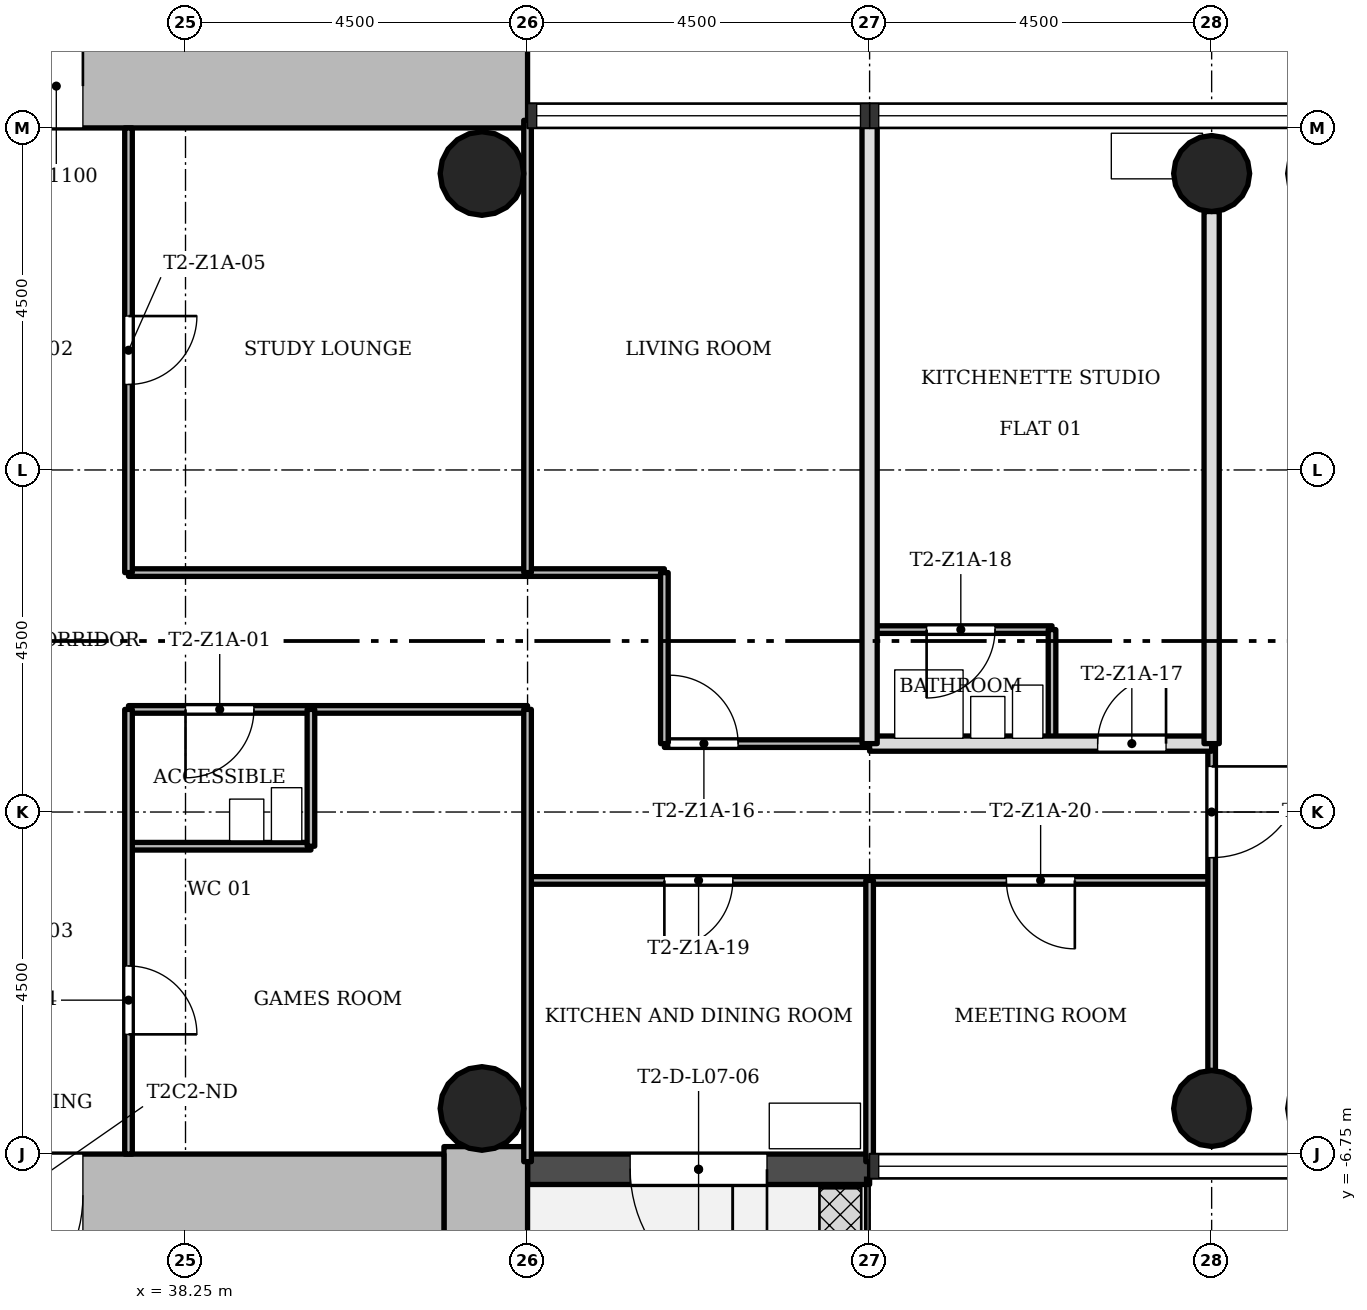
"""IFC4 building model, lengths in metres.
Left out: names, types, materials, properties, quantities, classifications, styles, units other than length and angle.
Written with IfcOpenShell. Run it as: python <this file> out.ifc"""

import sys

from ifc_helpers import new_model, si_unit, direction, frame, frame_2d, origin, origin_2d, place, context, subcontext, project, spatial, rectangle, hollow_circle, extrude, element, fill, save


model = new_model("IFC4")
c1 = context("Model", 3, precision=1e-05, world=origin(), true_north=direction((0.0, 1.0)))
c2 = subcontext(c1, "Body", "Model", "MODEL_VIEW")
j1 = project(units=[si_unit("LENGTHUNIT", "METRE"), si_unit("PLANEANGLEUNIT", "RADIAN")], contexts=[c1])
p1 = place(None, origin())
s1 = spatial("IfcSite", under=j1, at=p1, CompositionType="ELEMENT")
p2 = place(p1, origin())
s2 = spatial("IfcBuilding", under=s1, at=p2, CompositionType="ELEMENT")
p3 = place(p2, frame((0.0, 0.0, 31.3)))
s3 = spatial("IfcBuildingStorey", under=s2, at=p3, CompositionType="ELEMENT", Elevation=31.3)
p4 = place(p3, frame((30.35, 7.3, 0.0), z_axis=(0.0, 0.0, 1.0), x_axis=(1.0, 0.0, 0.0)))
e1 = element("IfcWall", 1, at=p4, inside=s3, PredefinedType="SHEAR", context=c2, shape_type="SweptSolid", body=[
    extrude(rectangle(XDim=12.4, YDim=1.1, at=frame_2d((6.2, 0.0))), origin(), (0.0, 0.0, 1.0), 3.4),
])
p5 = place(p4, frame((4.75, 0.0, 0.0)))
e2 = element("IfcOpeningElement", 2, at=p5, cuts=e1, PredefinedType="OPENING", context=c2, shape_type="SweptSolid", body=[
    extrude(rectangle(XDim=1.8, YDim=2.1, at=frame_2d((0.9, 1.05))), frame((0.0, 0.56, 0.0), z_axis=(0.0, -1.0, 0.0), x_axis=(1.0, 0.0, 0.0)), (0.0, 0.0, 1.0), 1.12),
])
p6 = place(p3, frame((42.2, -15.248, 0.0), z_axis=(0.0, 0.0, 1.0), x_axis=(0.0, 1.0, 0.0)))
e3 = element("IfcWall", 3, at=p6, inside=s3, PredefinedType="SHEAR", context=c2, shape_type="SweptSolid", body=[
    extrude(rectangle(XDim=8.596, YDim=1.1, at=frame_2d((4.298, 0.0))), origin(), (0.0, 0.0, 1.0), 3.4),
])
p7 = place(p3, frame((41.65, -7.3, 0.0), z_axis=(0.0, 0.0, 1.0), x_axis=(-1.0, 0.0, 0.0)))
e4 = element("IfcWall", 4, at=p7, inside=s3, PredefinedType="SHEAR", context=c2, shape_type="SweptSolid", body=[
    extrude(rectangle(XDim=12.4, YDim=1.1, at=frame_2d((6.2, 0.0))), origin(), (0.0, 0.0, 1.0), 3.4),
])
p8 = place(p7, frame((4.75, 0.0, 0.0)))
e5 = element("IfcOpeningElement", 5, at=p8, cuts=e4, PredefinedType="OPENING", context=c2, shape_type="SweptSolid", body=[
    extrude(rectangle(XDim=1.8, YDim=2.1, at=frame_2d((0.9, 1.05))), frame((0.0, 0.56, 0.0), z_axis=(0.0, -1.0, 0.0), x_axis=(1.0, 0.0, 0.0)), (0.0, 0.0, 1.0), 1.12),
])
for number, where, z_axis, x_axis in (
    (6, (51.75, -6.15, 0.0), (0.0, 0.0, 1.0), (1.0, 0.0, 0.0)),
    (7, (51.75, 6.15, 0.0), (0.0, 0.0, 1.0), (1.0, 0.0, 0.0)),
):
    element("IfcColumn", number, at=place(p3, frame(where, z_axis=z_axis, x_axis=x_axis)), inside=s3, PredefinedType="COLUMN", context=c2, shape_type="SweptSolid", body=[
        extrude(hollow_circle(Radius=0.5, WallThickness=0.036, at=origin_2d()), origin(), (0.0, 0.0, 1.0), 3.4),
    ])
for number, where, z_axis, x_axis in (
    (8, (42.15, -6.15, 0.0), (0.0, 0.0, 1.0), (1.0, 0.0, 0.0)),
    (9, (42.15, 6.15, 0.0), (0.0, 0.0, 1.0), (1.0, 0.0, 0.0)),
):
    element("IfcColumn", number, at=place(p3, frame(where, z_axis=z_axis, x_axis=x_axis)), inside=s3, PredefinedType="COLUMN", context=c2, shape_type="SweptSolid", body=[
        extrude(hollow_circle(Radius=0.55, WallThickness=0.04, at=origin_2d()), origin(), (0.0, 0.0, 1.0), 3.4),
    ])
p9 = place(p3, frame((42.75, -6.95, -0.02), z_axis=(0.0, 0.0, 1.0), x_axis=(1.0, 0.0, 0.0)))
e10 = element("IfcWall", 10, at=p9, inside=s3, PredefinedType="STANDARD", context=c2, shape_type="SweptSolid", body=[
    extrude(rectangle(XDim=4.5, YDim=0.4, at=frame_2d((2.25, 0.0))), origin(), (0.0, 0.0, 1.0), 3.12),
])
p10 = place(p9, frame((1.35, 0.0, 0.02)))
e11 = element("IfcOpeningElement", 11, at=p10, cuts=e10, PredefinedType="OPENING", context=c2, shape_type="SweptSolid", body=[
    extrude(rectangle(XDim=1.8, YDim=2.1, at=frame_2d((0.9, 1.05))), frame((0.0, 0.21, 0.0), z_axis=(0.0, -1.0, 0.0), x_axis=(1.0, 0.0, 0.0)), (0.0, 0.0, 1.0), 0.42),
])
p11 = place(p3, frame((51.75, -3.15, 0.0), z_axis=(0.0, 0.0, 1.0), x_axis=(-1.0, 0.0, 0.0)))
e12 = element("IfcWall", 12, at=p11, inside=s3, PredefinedType="PARTITIONING", context=c2, shape_type="SweptSolid", body=[
    extrude(rectangle(XDim=9.0, YDim=0.1, at=frame_2d((4.5, 0.0))), origin(), (0.0, 0.0, 1.0), 3.0),
])
p12 = place(p11, frame((6.3, 0.0, 0.0)))
e13 = element("IfcOpeningElement", 13, at=p12, cuts=e12, PredefinedType="OPENING", context=c2, shape_type="SweptSolid", body=[
    extrude(rectangle(XDim=0.9, YDim=2.1, at=frame_2d((0.45, 1.05))), frame((0.0, 0.06, 0.0), z_axis=(0.0, -1.0, 0.0), x_axis=(1.0, 0.0, 0.0)), (0.0, 0.0, 1.0), 0.12),
])
p13 = place(p11, frame((1.8, 0.0, 0.0)))
e14 = element("IfcOpeningElement", 14, at=p13, cuts=e12, PredefinedType="OPENING", context=c2, shape_type="SweptSolid", body=[
    extrude(rectangle(XDim=0.9, YDim=2.1, at=frame_2d((0.45, 1.05))), frame((0.0, 0.06, 0.0), z_axis=(0.0, -1.0, 0.0), x_axis=(1.0, 0.0, 0.0)), (0.0, 0.0, 1.0), 0.12),
])
p14 = place(p3, frame((39.9, -2.7, 0.0), z_axis=(0.0, 0.0, 1.0), x_axis=(-1.0, 0.0, 0.0)))
e15 = element("IfcWall", 15, at=p14, inside=s3, PredefinedType="PARTITIONING", context=c2, shape_type="SweptSolid", body=[
    extrude(rectangle(XDim=2.4, YDim=0.1, at=frame_2d((1.2, 0.0))), origin(), (0.0, 0.0, 1.0), 3.0),
])
p15 = place(p3, frame((47.25, -1.35, 0.0), z_axis=(0.0, 0.0, 1.0), x_axis=(-1.0, 0.0, 0.0)))
e16 = element("IfcWall", 16, at=p15, inside=s3, PredefinedType="PARTITIONING", context=c2, shape_type="SweptSolid", body=[
    extrude(rectangle(XDim=2.7, YDim=0.1, at=frame_2d((1.35, 0.0))), origin(), (0.0, 0.0, 1.0), 3.0),
])
p16 = place(p15, frame((1.73, 0.0, 0.0)))
e17 = element("IfcOpeningElement", 17, at=p16, cuts=e16, PredefinedType="OPENING", context=c2, shape_type="SweptSolid", body=[
    extrude(rectangle(XDim=0.9, YDim=2.1, at=frame_2d((0.45, 1.05))), frame((0.0, 0.06, 0.0), z_axis=(0.0, -1.0, 0.0), x_axis=(1.0, 0.0, 0.0)), (0.0, 0.0, 1.0), 0.12),
])
p17 = place(p3, frame((51.75, -1.35, 0.0), z_axis=(0.0, 0.0, 1.0), x_axis=(-1.0, 0.0, 0.0)))
e18 = element("IfcWall", 18, at=p17, inside=s3, PredefinedType="SOLIDWALL", context=c2, shape_type="SweptSolid", body=[
    extrude(rectangle(XDim=4.5, YDim=0.2, at=frame_2d((2.25, 0.0))), origin(), (0.0, 0.0, 1.0), 3.0),
])
p18 = place(p17, frame((0.6, 0.0, 0.0)))
e19 = element("IfcOpeningElement", 19, at=p18, cuts=e18, PredefinedType="OPENING", context=c2, shape_type="SweptSolid", body=[
    extrude(rectangle(XDim=0.9, YDim=2.1, at=frame_2d((0.45, 1.05))), frame((0.0, 0.11, 0.0), z_axis=(0.0, -1.0, 0.0), x_axis=(1.0, 0.0, 0.0)), (0.0, 0.0, 1.0), 0.22),
])
p19 = place(p3, frame((42.75, -0.9, 0.0), z_axis=(0.0, 0.0, 1.0), x_axis=(-1.0, 0.0, 0.0)))
e20 = element("IfcWall", 20, at=p19, inside=s3, PredefinedType="PARTITIONING", context=c2, shape_type="SweptSolid", body=[
    extrude(rectangle(XDim=5.25, YDim=0.1, at=frame_2d((2.625, 0.0))), origin(), (0.0, 0.0, 1.0), 3.0),
])
p20 = place(p19, frame((3.6, 0.0, 0.0)))
e21 = element("IfcOpeningElement", 21, at=p20, cuts=e20, PredefinedType="OPENING", context=c2, shape_type="SweptSolid", body=[
    extrude(rectangle(XDim=0.9, YDim=2.1, at=frame_2d((0.45, 1.05))), frame((0.0, 0.06, 0.0), z_axis=(0.0, -1.0, 0.0), x_axis=(1.0, 0.0, 0.0)), (0.0, 0.0, 1.0), 0.12),
])
p21 = place(p3, frame((49.65, 0.15, 0.0), z_axis=(0.0, 0.0, 1.0), x_axis=(-1.0, 0.0, 0.0)))
e22 = element("IfcWall", 22, at=p21, inside=s3, PredefinedType="PARTITIONING", context=c2, shape_type="SweptSolid", body=[
    extrude(rectangle(XDim=2.4, YDim=0.1, at=frame_2d((1.2, 0.0))), origin(), (0.0, 0.0, 1.0), 3.0),
])
p22 = place(p21, frame((0.75, 0.0, 0.0)))
e23 = element("IfcOpeningElement", 23, at=p22, cuts=e22, PredefinedType="OPENING", context=c2, shape_type="SweptSolid", body=[
    extrude(rectangle(XDim=0.9, YDim=2.1, at=frame_2d((0.45, 1.05))), frame((0.0, 0.06, 0.0), z_axis=(0.0, -1.0, 0.0), x_axis=(1.0, 0.0, 0.0)), (0.0, 0.0, 1.0), 0.12),
])
p23 = place(p3, frame((44.55, 0.9, 0.0), z_axis=(0.0, 0.0, 1.0), x_axis=(-1.0, 0.0, 0.0)))
e24 = element("IfcWall", 24, at=p23, inside=s3, PredefinedType="PARTITIONING", context=c2, shape_type="SweptSolid", body=[
    extrude(rectangle(XDim=7.05, YDim=0.1, at=frame_2d((3.525, 0.0))), origin(), (0.0, 0.0, 1.0), 3.0),
])
p24 = place(p3, frame((51.75, -5.65, 0.0), z_axis=(0.0, 0.0, 1.0), x_axis=(0.0, 1.0, 0.0)))
e25 = element("IfcWall", 25, at=p24, inside=s3, PredefinedType="PARTITIONING", context=c2, shape_type="SweptSolid", body=[
    extrude(rectangle(XDim=4.3, YDim=0.1, at=frame_2d((2.15, 0.0))), origin(), (0.0, 0.0, 1.0), 3.0),
])
p25 = place(p24, frame((2.8, 0.0, 0.0)))
e26 = element("IfcOpeningElement", 26, at=p25, cuts=e25, PredefinedType="OPENING", context=c2, shape_type="SweptSolid", body=[
    extrude(rectangle(XDim=1.2, YDim=2.1, at=frame_2d((0.6, 1.05))), frame((0.0, 0.06, 0.0), z_axis=(0.0, -1.0, 0.0), x_axis=(1.0, 0.0, 0.0)), (0.0, 0.0, 1.0), 0.12),
])
p26 = place(p3, frame((51.75, -1.35, 0.0), z_axis=(0.0, 0.0, 1.0), x_axis=(0.0, 1.0, 0.0)))
e27 = element("IfcWall", 27, at=p26, inside=s3, PredefinedType="SOLIDWALL", context=c2, shape_type="SweptSolid", body=[
    extrude(rectangle(XDim=7.0, YDim=0.2, at=frame_2d((3.5, 0.0))), origin(), (0.0, 0.0, 1.0), 3.0),
])
p27 = place(p3, frame((49.65, -1.35, 0.0), z_axis=(0.0, 0.0, 1.0), x_axis=(0.0, 1.0, 0.0)))
e28 = element("IfcWall", 28, at=p27, inside=s3, PredefinedType="PARTITIONING", context=c2, shape_type="SweptSolid", body=[
    extrude(rectangle(XDim=1.5, YDim=0.1, at=frame_2d((0.75, 0.0))), origin(), (0.0, 0.0, 1.0), 3.0),
])
p28 = place(p3, frame((47.25, -6.85, 0.0), z_axis=(0.0, 0.0, 1.0), x_axis=(0.0, 1.0, 0.0)))
e29 = element("IfcWall", 29, at=p28, inside=s3, PredefinedType="PARTITIONING", context=c2, shape_type="SweptSolid", body=[
    extrude(rectangle(XDim=3.7, YDim=0.1, at=frame_2d((1.85, 0.0))), origin(), (0.0, 0.0, 1.0), 3.0),
])
p29 = place(p3, frame((47.25, -1.35, 0.0), z_axis=(0.0, 0.0, 1.0), x_axis=(0.0, 1.0, 0.0)))
e30 = element("IfcWall", 30, at=p29, inside=s3, PredefinedType="SOLIDWALL", context=c2, shape_type="SweptSolid", body=[
    extrude(rectangle(XDim=8.2, YDim=0.2, at=frame_2d((4.1, 0.0))), origin(), (0.0, 0.0, 1.0), 3.0),
])
p30 = place(p3, frame((44.55, -1.35, 0.0), z_axis=(0.0, 0.0, 1.0), x_axis=(0.0, 1.0, 0.0)))
e31 = element("IfcWall", 31, at=p30, inside=s3, PredefinedType="PARTITIONING", context=c2, shape_type="SweptSolid", body=[
    extrude(rectangle(XDim=2.25, YDim=0.1, at=frame_2d((1.125, 0.0))), origin(), (0.0, 0.0, 1.0), 3.0),
])
for number, where, z_axis, x_axis in (
    (32, (42.75, -6.85, 0.0), (0.0, 0.0, 1.0), (0.0, 1.0, 0.0)),
    (33, (42.75, 0.9, 0.0), (0.0, 0.0, 1.0), (0.0, 1.0, 0.0)),
):
    element("IfcWall", number, at=place(p3, frame(where, z_axis=z_axis, x_axis=x_axis)), inside=s3, PredefinedType="PARTITIONING", context=c2, shape_type="SweptSolid", body=[
        extrude(rectangle(XDim=5.95, YDim=0.1, at=frame_2d((2.975, 0.0))), origin(), (0.0, 0.0, 1.0), 3.0),
    ])
p31 = place(p3, frame((39.9, -2.7, 0.0), z_axis=(0.0, 0.0, 1.0), x_axis=(0.0, 1.0, 0.0)))
e34 = element("IfcWall", 34, at=p31, inside=s3, PredefinedType="PARTITIONING", context=c2, shape_type="SweptSolid", body=[
    extrude(rectangle(XDim=1.8, YDim=0.1, at=frame_2d((0.9, 0.0))), origin(), (0.0, 0.0, 1.0), 3.0),
])
p32 = place(p3, frame((37.5, -6.75, 0.0), z_axis=(0.0, 0.0, 1.0), x_axis=(0.0, 1.0, 0.0)))
e35 = element("IfcWall", 35, at=p32, inside=s3, PredefinedType="PARTITIONING", context=c2, shape_type="SweptSolid", body=[
    extrude(rectangle(XDim=5.85, YDim=0.1, at=frame_2d((2.925, 0.0))), origin(), (0.0, 0.0, 1.0), 3.0),
])
p33 = place(p32, frame((1.575, 0.0, 0.0)))
e36 = element("IfcOpeningElement", 36, at=p33, cuts=e35, PredefinedType="OPENING", context=c2, shape_type="SweptSolid", body=[
    extrude(rectangle(XDim=0.9, YDim=2.1, at=frame_2d((0.45, 1.05))), frame((0.0, 0.06, 0.0), z_axis=(0.0, -1.0, 0.0), x_axis=(1.0, 0.0, 0.0)), (0.0, 0.0, 1.0), 0.12),
])
p34 = place(p3, frame((37.5, 0.9, 0.0), z_axis=(0.0, 0.0, 1.0), x_axis=(0.0, 1.0, 0.0)))
e37 = element("IfcWall", 37, at=p34, inside=s3, PredefinedType="PARTITIONING", context=c2, shape_type="SweptSolid", body=[
    extrude(rectangle(XDim=5.85, YDim=0.1, at=frame_2d((2.925, 0.0))), origin(), (0.0, 0.0, 1.0), 3.0),
])
p35 = place(p34, frame((2.475, 0.0, 0.0)))
e38 = element("IfcOpeningElement", 38, at=p35, cuts=e37, PredefinedType="OPENING", context=c2, shape_type="SweptSolid", body=[
    extrude(rectangle(XDim=0.9, YDim=2.1, at=frame_2d((0.45, 1.05))), frame((0.0, 0.06, 0.0), z_axis=(0.0, -1.0, 0.0), x_axis=(1.0, 0.0, 0.0)), (0.0, 0.0, 1.0), 0.12),
])
p36 = place(p10, origin())
e39 = element("IfcDoor", 39, at=p36, inside=s3, OperationType="SINGLE_SWING_RIGHT", PredefinedType="DOOR", context=c2, shape_type="SweptSolid", body=[
    extrude(rectangle(XDim=1.8, YDim=2.1, at=frame_2d((0.9, 1.05))), frame((0.0, 0.025, 0.0), z_axis=(0.0, -1.0, 0.0), x_axis=(1.0, 0.0, 0.0)), (0.0, 0.0, 1.0), 0.05),
])
fill(e11, e39)
p37 = place(p20, origin())
e40 = element("IfcDoor", 40, at=p37, inside=s3, OperationType="SINGLE_SWING_LEFT", PredefinedType="DOOR", context=c2, shape_type="SweptSolid", body=[
    extrude(rectangle(XDim=0.9, YDim=2.1, at=frame_2d((0.45, 1.05))), frame((0.0, 0.025, 0.0), z_axis=(0.0, -1.0, 0.0), x_axis=(1.0, 0.0, 0.0)), (0.0, 0.0, 1.0), 0.05),
])
fill(e21, e40)
p38 = place(p33, origin())
e41 = element("IfcDoor", 41, at=p38, inside=s3, OperationType="SINGLE_SWING_LEFT", PredefinedType="DOOR", context=c2, shape_type="SweptSolid", body=[
    extrude(rectangle(XDim=0.9, YDim=2.1, at=frame_2d((0.45, 1.05))), frame((0.0, 0.025, 0.0), z_axis=(0.0, -1.0, 0.0), x_axis=(1.0, 0.0, 0.0)), (0.0, 0.0, 1.0), 0.05),
])
fill(e36, e41)
p39 = place(p35, origin())
e42 = element("IfcDoor", 42, at=p39, inside=s3, OperationType="SINGLE_SWING_RIGHT", PredefinedType="DOOR", context=c2, shape_type="SweptSolid", body=[
    extrude(rectangle(XDim=0.9, YDim=2.1, at=frame_2d((0.45, 1.05))), frame((0.0, 0.025, 0.0), z_axis=(0.0, -1.0, 0.0), x_axis=(1.0, 0.0, 0.0)), (0.0, 0.0, 1.0), 0.05),
])
fill(e38, e42)
p40 = place(p16, origin())
e43 = element("IfcDoor", 43, at=p40, inside=s3, OperationType="SINGLE_SWING_RIGHT", PredefinedType="DOOR", context=c2, shape_type="SweptSolid", body=[
    extrude(rectangle(XDim=0.9, YDim=2.1, at=frame_2d((0.45, 1.05))), frame((0.0, 0.025, 0.0), z_axis=(0.0, -1.0, 0.0), x_axis=(1.0, 0.0, 0.0)), (0.0, 0.0, 1.0), 0.05),
])
fill(e17, e43)
p41 = place(p18, origin())
e44 = element("IfcDoor", 44, at=p41, inside=s3, OperationType="SINGLE_SWING_LEFT", PredefinedType="DOOR", context=c2, shape_type="SweptSolid", body=[
    extrude(rectangle(XDim=0.9, YDim=2.1, at=frame_2d((0.45, 1.05))), frame((0.0, 0.025, 0.0), z_axis=(0.0, -1.0, 0.0), x_axis=(1.0, 0.0, 0.0)), (0.0, 0.0, 1.0), 0.05),
])
fill(e19, e44)
p42 = place(p22, origin())
e45 = element("IfcDoor", 45, at=p42, inside=s3, OperationType="SINGLE_SWING_LEFT", PredefinedType="DOOR", context=c2, shape_type="SweptSolid", body=[
    extrude(rectangle(XDim=0.9, YDim=2.1, at=frame_2d((0.45, 1.05))), frame((0.0, 0.025, 0.0), z_axis=(0.0, -1.0, 0.0), x_axis=(1.0, 0.0, 0.0)), (0.0, 0.0, 1.0), 0.05),
])
fill(e23, e45)
p43 = place(p12, origin())
e46 = element("IfcDoor", 46, at=p43, inside=s3, OperationType="SINGLE_SWING_LEFT", PredefinedType="DOOR", context=c2, shape_type="SweptSolid", body=[
    extrude(rectangle(XDim=0.9, YDim=2.1, at=frame_2d((0.45, 1.05))), frame((0.0, 0.025, 0.0), z_axis=(0.0, -1.0, 0.0), x_axis=(1.0, 0.0, 0.0)), (0.0, 0.0, 1.0), 0.05),
])
fill(e13, e46)
p44 = place(p13, origin())
e47 = element("IfcDoor", 47, at=p44, inside=s3, OperationType="SINGLE_SWING_RIGHT", PredefinedType="DOOR", context=c2, shape_type="SweptSolid", body=[
    extrude(rectangle(XDim=0.9, YDim=2.1, at=frame_2d((0.45, 1.05))), frame((0.0, 0.025, 0.0), z_axis=(0.0, -1.0, 0.0), x_axis=(1.0, 0.0, 0.0)), (0.0, 0.0, 1.0), 0.05),
])
fill(e14, e47)
p45 = place(p25, origin())
e48 = element("IfcDoor", 48, at=p45, inside=s3, OperationType="SINGLE_SWING_RIGHT", PredefinedType="DOOR", context=c2, shape_type="SweptSolid", body=[
    extrude(rectangle(XDim=1.2, YDim=2.1, at=frame_2d((0.6, 1.05))), frame((0.0, 0.025, 0.0), z_axis=(0.0, -1.0, 0.0), x_axis=(1.0, 0.0, 0.0)), (0.0, 0.0, 1.0), 0.05),
])
fill(e26, e48)
p46 = place(p5, origin())
e49 = element("IfcDoor", 49, at=p46, inside=s3, OperationType="SINGLE_SWING_LEFT", PredefinedType="DOOR", context=c2, shape_type="SweptSolid", body=[
    extrude(rectangle(XDim=1.8, YDim=2.1, at=frame_2d((0.9, 1.05))), frame((0.0, 0.025, 0.0), z_axis=(0.0, -1.0, 0.0), x_axis=(1.0, 0.0, 0.0)), (0.0, 0.0, 1.0), 0.05),
])
fill(e2, e49)
p47 = place(p8, origin())
e50 = element("IfcDoor", 50, at=p47, inside=s3, OperationType="SINGLE_SWING_LEFT", PredefinedType="DOOR", context=c2, shape_type="SweptSolid", body=[
    extrude(rectangle(XDim=1.8, YDim=2.1, at=frame_2d((0.9, 1.05))), frame((0.0, 0.025, 0.0), z_axis=(0.0, -1.0, 0.0), x_axis=(1.0, 0.0, 0.0)), (0.0, 0.0, 1.0), 0.05),
])
fill(e5, e50)
save(model, sys.argv[1])
